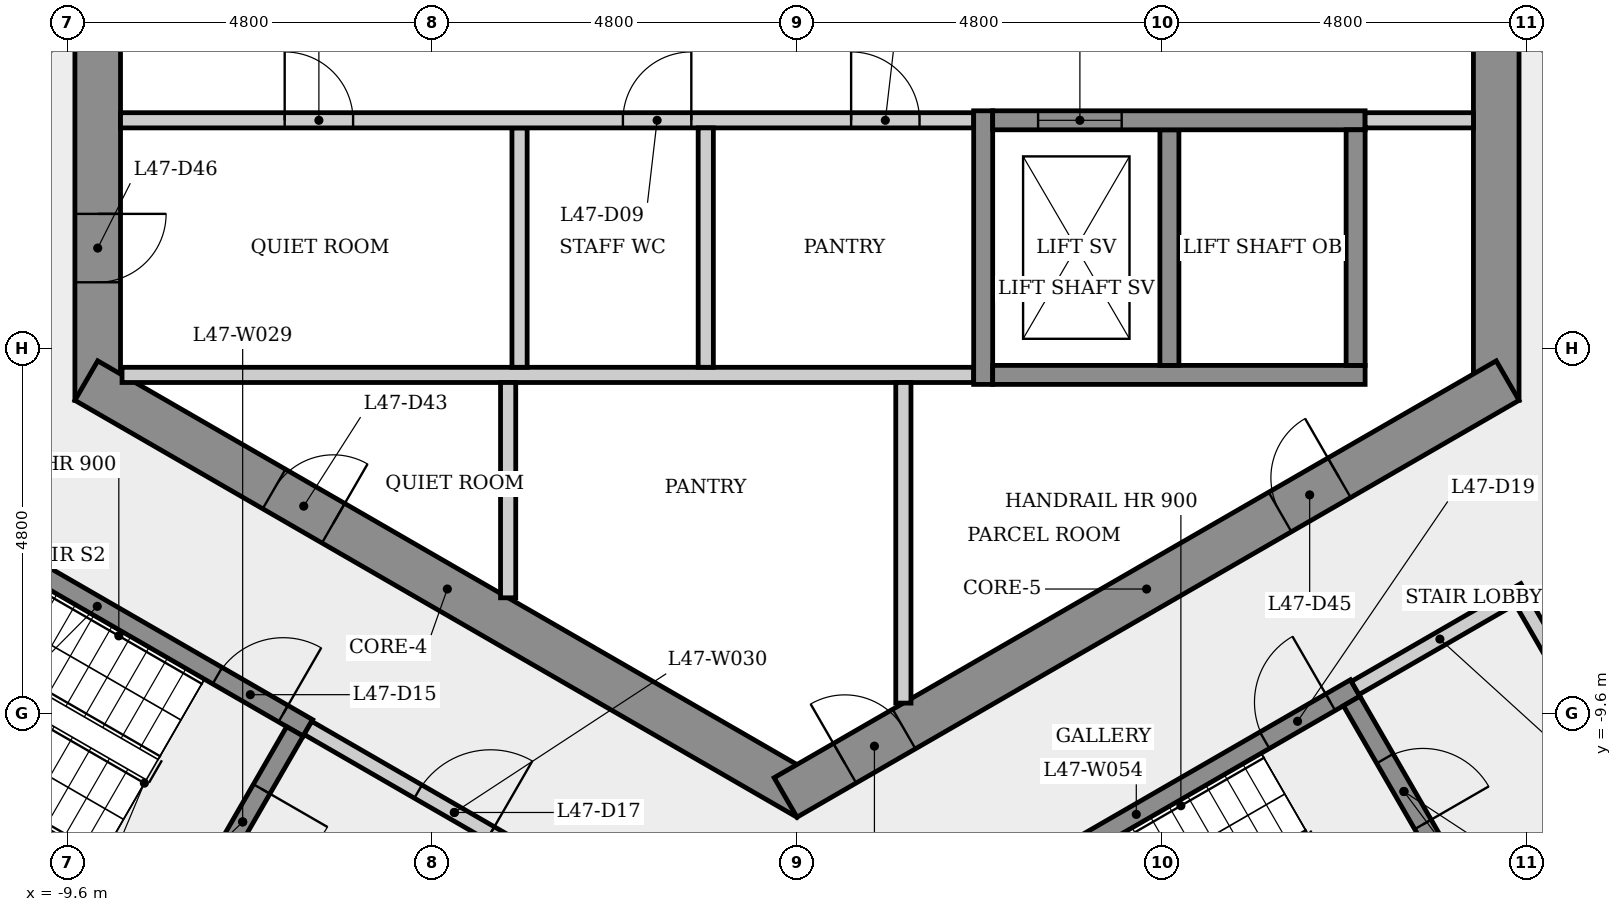
"""IFC4 building model, lengths in metres.
Left out: names, types, materials, properties, quantities, classifications, styles, units other than length and angle.
Written with IfcOpenShell. Run it as: python <this file> out.ifc"""

import sys

from ifc_helpers import new_model, si_unit, direction, frame, frame_2d, origin, place, context, subcontext, project, spatial, rectangle, extrude, element, fill, save


model = new_model("IFC4")
c1 = context("Model", 3, precision=1e-05, world=origin(), true_north=direction((0.0, 1.0)))
c2 = subcontext(c1, "Body", "Model", "MODEL_VIEW")
j1 = project(units=[si_unit("LENGTHUNIT", "METRE"), si_unit("PLANEANGLEUNIT", "RADIAN")], contexts=[c1])
p1 = place(None, origin())
s1 = spatial("IfcSite", under=j1, at=p1, CompositionType="ELEMENT")
p2 = place(p1, origin())
s2 = spatial("IfcBuilding", under=s1, at=p2, CompositionType="ELEMENT")
p3 = place(p2, frame((0.0, 0.0, 176.5)))
s3 = spatial("IfcBuildingStorey", under=s2, at=p3, CompositionType="ELEMENT", Elevation=176.5)
p4 = place(p3, frame((9.2, -5.485, 0.0), z_axis=(0.0, 0.0, 1.0), x_axis=(0.0, 1.0, 0.0)))
e1 = element("IfcWall", 1, at=p4, inside=s3, PredefinedType="SHEAR", context=c2, shape_type="SweptSolid", body=[
    extrude(rectangle(XDim=10.97, YDim=0.6, at=frame_2d((5.485, 0.0))), origin(), (0.0, 0.0, 1.0), 3.4),
])
p5 = place(p4, frame((4.685, 0.0, 0.0)))
e2 = element("IfcOpeningElement", 2, at=p5, cuts=e1, PredefinedType="OPENING", context=c2, shape_type="SweptSolid", body=[
    extrude(rectangle(XDim=1.6, YDim=2.1, at=frame_2d((0.8, 1.05))), frame((0.0, 0.31, 0.0), z_axis=(0.0, -1.0, 0.0), x_axis=(1.0, 0.0, 0.0)), (0.0, 0.0, 1.0), 0.62),
])
p6 = place(p3, frame((-9.2, 5.485, 0.0), z_axis=(0.0, 0.0, 1.0), x_axis=(0.0, -1.0, 0.0)))
e3 = element("IfcWall", 3, at=p6, inside=s3, PredefinedType="SHEAR", context=c2, shape_type="SweptSolid", body=[
    extrude(rectangle(XDim=10.97, YDim=0.6, at=frame_2d((5.485, 0.0))), origin(), (0.0, 0.0, 1.0), 3.4),
])
p7 = place(p6, frame((8.516, 0.0, 0.0)))
e4 = element("IfcOpeningElement", 4, at=p7, cuts=e3, PredefinedType="OPENING", context=c2, shape_type="SweptSolid", body=[
    extrude(rectangle(XDim=0.9, YDim=2.1, at=frame_2d((0.45, 1.05))), frame((0.0, 0.31, 0.0), z_axis=(0.0, -1.0, 0.0), x_axis=(1.0, 0.0, 0.0)), (0.0, 0.0, 1.0), 0.62),
])
p8 = place(p6, frame((4.685, 0.0, 0.0)))
e5 = element("IfcOpeningElement", 5, at=p8, cuts=e3, PredefinedType="OPENING", context=c2, shape_type="SweptSolid", body=[
    extrude(rectangle(XDim=1.6, YDim=2.1, at=frame_2d((0.8, 1.05))), frame((0.0, 0.31, 0.0), z_axis=(0.0, -1.0, 0.0), x_axis=(1.0, 0.0, 0.0)), (0.0, 0.0, 1.0), 0.62),
])
p9 = place(p3, frame((-9.35, -5.225, 0.0), z_axis=(0.0, 0.0, 1.0), x_axis=(0.866023993627, -0.500002442456, 0.0)))
e6 = element("IfcWall", 6, at=p9, inside=s3, PredefinedType="SHEAR", context=c2, shape_type="SweptSolid", body=[
    extrude(rectangle(XDim=10.97, YDim=0.6, at=frame_2d((5.485, 0.0))), origin(), (0.0, 0.0, 1.0), 3.4),
])
p10 = place(p9, frame((2.853, 0.0, 0.0)))
e7 = element("IfcOpeningElement", 7, at=p10, cuts=e6, PredefinedType="OPENING", context=c2, shape_type="SweptSolid", body=[
    extrude(rectangle(XDim=0.9, YDim=2.1, at=frame_2d((0.45, 1.05))), frame((0.0, 0.31, 0.0), z_axis=(0.0, -1.0, 0.0), x_axis=(1.0, 0.0, 0.0)), (0.0, 0.0, 1.0), 0.62),
])
p11 = place(p3, frame((-0.15, -10.71, 0.0), z_axis=(0.0, 0.0, 1.0), x_axis=(0.866023993627, 0.500002442456, 0.0)))
e8 = element("IfcWall", 8, at=p11, inside=s3, PredefinedType="SHEAR", context=c2, shape_type="SweptSolid", body=[
    extrude(rectangle(XDim=10.97, YDim=0.6, at=frame_2d((5.485, 0.0))), origin(), (0.0, 0.0, 1.0), 3.4),
])
p12 = place(p11, frame((0.9, 0.0, 0.0)))
e9 = element("IfcOpeningElement", 9, at=p12, cuts=e8, PredefinedType="OPENING", context=c2, shape_type="SweptSolid", body=[
    extrude(rectangle(XDim=0.9, YDim=2.1, at=frame_2d((0.45, 1.05))), frame((0.0, 0.31, 0.0), z_axis=(0.0, -1.0, 0.0), x_axis=(1.0, 0.0, 0.0)), (0.0, 0.0, 1.0), 0.62),
])
p13 = place(p11, frame((7.512, 0.0, 0.0)))
e10 = element("IfcOpeningElement", 10, at=p13, cuts=e8, PredefinedType="OPENING", context=c2, shape_type="SweptSolid", body=[
    extrude(rectangle(XDim=0.9, YDim=2.1, at=frame_2d((0.45, 1.05))), frame((0.0, 0.31, 0.0), z_axis=(0.0, -1.0, 0.0), x_axis=(1.0, 0.0, 0.0)), (0.0, 0.0, 1.0), 0.62),
])
p14 = place(p3, frame((-11.977, -6.595, 0.0), z_axis=(0.0, 0.0, 1.0), x_axis=(0.866025499775, -0.499999833739, 0.0)))
e11 = element("IfcWall", 11, at=p14, inside=s3, PredefinedType="SHEAR", context=c2, shape_type="SweptSolid", body=[
    extrude(rectangle(XDim=6.4, YDim=0.25, at=frame_2d((3.2, 0.0))), origin(), (0.0, 0.0, 1.0), 3.05),
])
p15 = place(p14, frame((5.025, 0.0, 0.0)))
e12 = element("IfcOpeningElement", 12, at=p15, cuts=e11, PredefinedType="OPENING", context=c2, shape_type="SweptSolid", body=[
    extrude(rectangle(XDim=1.0, YDim=2.1, at=frame_2d((0.5, 1.05))), frame((0.0, 0.135, 0.0), z_axis=(0.0, -1.0, 0.0), x_axis=(1.0, 0.0, 0.0)), (0.0, 0.0, 1.0), 0.27),
])
p16 = place(p3, frame((-8.88, -5.15, 0.0), z_axis=(0.0, 0.0, 1.0), x_axis=(1.0, 0.0, 0.0)))
e13 = element("IfcWall", 13, at=p16, inside=s3, PredefinedType="PARTITIONING", context=c2, shape_type="SweptSolid", body=[
    extrude(rectangle(XDim=11.205, YDim=0.2, at=frame_2d((5.603, 0.0))), origin(), (0.0, 0.0, 1.0), 3.05),
])
p17 = place(p3, frame((-7.935, -12.393, 0.0), z_axis=(0.0, 0.0, 1.0), x_axis=(-0.866025499775, 0.499999833739, 0.0)))
e14 = element("IfcWall", 14, at=p17, inside=s3, PredefinedType="SHEAR", context=c2, shape_type="SweptSolid", body=[
    extrude(rectangle(XDim=6.4, YDim=0.25, at=frame_2d((3.2, 0.0))), origin(), (0.0, 0.0, 1.0), 3.05),
])
p18 = place(p3, frame((-6.605, -9.841, 0.0), z_axis=(0.0, 0.0, 1.0), x_axis=(-0.499996545922, -0.866027397988, 0.0)))
e15 = element("IfcWall", 15, at=p18, inside=s3, PredefinedType="SHEAR", context=c2, shape_type="SweptSolid", body=[
    extrude(rectangle(XDim=2.75, YDim=0.25, at=frame_2d((1.375, 0.0))), origin(), (0.0, 0.0, 1.0), 3.05),
])
p19 = place(p18, frame((0.875, 0.0, 0.0)))
e16 = element("IfcOpeningElement", 16, at=p19, cuts=e15, PredefinedType="OPENING", context=c2, shape_type="SweptSolid", body=[
    extrude(rectangle(XDim=1.0, YDim=2.1, at=frame_2d((0.5, 1.05))), frame((0.0, 0.135, 0.0), z_axis=(0.0, -1.0, 0.0), x_axis=(1.0, 0.0, 0.0)), (0.0, 0.0, 1.0), 0.27),
])
p20 = place(p3, frame((-6.435, -9.795, 0.0), z_axis=(0.0, 0.0, 1.0), x_axis=(0.866012907634, -0.500021643343, 0.0)))
e17 = element("IfcWall", 17, at=p20, inside=s3, PredefinedType="PARTITIONING", context=c2, shape_type="SweptSolid", body=[
    extrude(rectangle(XDim=4.45, YDim=0.2, at=frame_2d((2.225, 0.0))), origin(), (0.0, 0.0, 1.0), 3.05),
])
p21 = place(p20, frame((1.675, 0.0, 0.0)))
e18 = element("IfcOpeningElement", 18, at=p21, cuts=e17, PredefinedType="OPENING", context=c2, shape_type="SweptSolid", body=[
    extrude(rectangle(XDim=1.1, YDim=2.1, at=frame_2d((0.55, 1.05))), frame((0.0, 0.11, 0.0), z_axis=(0.0, -1.0, 0.0), x_axis=(1.0, 0.0, 0.0)), (0.0, 0.0, 1.0), 0.22),
])
p22 = place(p3, frame((-3.8, -5.25, 0.0), z_axis=(0.0, 0.0, 1.0), x_axis=(0.0, -1.0, 0.0)))
e19 = element("IfcWall", 19, at=p22, inside=s3, PredefinedType="PARTITIONING", context=c2, shape_type="SweptSolid", body=[
    extrude(rectangle(XDim=2.833, YDim=0.2, at=frame_2d((1.417, 0.0))), origin(), (0.0, 0.0, 1.0), 3.05),
])
p23 = place(p3, frame((-3.65, -1.9, 0.0), z_axis=(0.0, 0.0, 1.0), x_axis=(0.0, -1.0, 0.0)))
e20 = element("IfcWall", 20, at=p23, inside=s3, PredefinedType="PARTITIONING", context=c2, shape_type="SweptSolid", body=[
    extrude(rectangle(XDim=3.15, YDim=0.2, at=frame_2d((1.575, 0.0))), origin(), (0.0, 0.0, 1.0), 3.05),
])
p24 = place(p3, frame((-8.9, -1.8, 0.0), z_axis=(0.0, 0.0, 1.0), x_axis=(1.0, 0.0, 0.0)))
e21 = element("IfcWall", 21, at=p24, inside=s3, PredefinedType="PARTITIONING", context=c2, shape_type="SweptSolid", body=[
    extrude(rectangle(XDim=11.225, YDim=0.2, at=frame_2d((5.613, 0.0))), origin(), (0.0, 0.0, 1.0), 3.05),
])
p25 = place(p24, frame((2.16, 0.0, 0.0)))
e22 = element("IfcOpeningElement", 22, at=p25, cuts=e21, PredefinedType="OPENING", context=c2, shape_type="SweptSolid", body=[
    extrude(rectangle(XDim=0.9, YDim=2.1, at=frame_2d((0.45, 1.05))), frame((0.0, 0.11, 0.0), z_axis=(0.0, -1.0, 0.0), x_axis=(1.0, 0.0, 0.0)), (0.0, 0.0, 1.0), 0.22),
])
p26 = place(p24, frame((6.61, 0.0, 0.0)))
e23 = element("IfcOpeningElement", 23, at=p26, cuts=e21, PredefinedType="OPENING", context=c2, shape_type="SweptSolid", body=[
    extrude(rectangle(XDim=0.9, YDim=2.1, at=frame_2d((0.45, 1.05))), frame((0.0, 0.11, 0.0), z_axis=(0.0, -1.0, 0.0), x_axis=(1.0, 0.0, 0.0)), (0.0, 0.0, 1.0), 0.22),
])
p27 = place(p24, frame((9.613, 0.0, 0.0)))
e24 = element("IfcOpeningElement", 24, at=p27, cuts=e21, PredefinedType="OPENING", context=c2, shape_type="SweptSolid", body=[
    extrude(rectangle(XDim=0.9, YDim=2.1, at=frame_2d((0.45, 1.05))), frame((0.0, 0.11, 0.0), z_axis=(0.0, -1.0, 0.0), x_axis=(1.0, 0.0, 0.0)), (0.0, 0.0, 1.0), 0.22),
])
p28 = place(p3, frame((-1.2, -1.9, 0.0), z_axis=(0.0, 0.0, 1.0), x_axis=(0.0, -1.0, 0.0)))
e25 = element("IfcWall", 25, at=p28, inside=s3, PredefinedType="PARTITIONING", context=c2, shape_type="SweptSolid", body=[
    extrude(rectangle(XDim=3.15, YDim=0.2, at=frame_2d((1.575, 0.0))), origin(), (0.0, 0.0, 1.0), 3.05),
])
p29 = place(p3, frame((1.4, -5.25, 0.0), z_axis=(0.0, 0.0, 1.0), x_axis=(0.0, -1.0, 0.0)))
e26 = element("IfcWall", 26, at=p29, inside=s3, PredefinedType="PARTITIONING", context=c2, shape_type="SweptSolid", body=[
    extrude(rectangle(XDim=4.219, YDim=0.2, at=frame_2d((2.109, 0.0))), origin(), (0.0, 0.0, 1.0), 3.05),
])
p30 = place(p3, frame((1.585, -12.595, 0.0), z_axis=(0.0, 0.0, 1.0), x_axis=(0.866036417653, 0.499980922934, 0.0)))
e27 = element("IfcWall", 27, at=p30, inside=s3, PredefinedType="SHEAR", context=c2, shape_type="SweptSolid", body=[
    extrude(rectangle(XDim=6.65, YDim=0.25, at=frame_2d((3.325, 0.0))), origin(), (0.0, 0.0, 1.0), 3.05),
])
p31 = place(p30, frame((5.275, 0.0, 0.0)))
e28 = element("IfcOpeningElement", 28, at=p31, cuts=e27, PredefinedType="OPENING", context=c2, shape_type="SweptSolid", body=[
    extrude(rectangle(XDim=1.0, YDim=2.1, at=frame_2d((0.5, 1.05))), frame((0.0, 0.135, 0.0), z_axis=(0.0, -1.0, 0.0), x_axis=(1.0, 0.0, 0.0)), (0.0, 0.0, 1.0), 0.27),
])
p32 = place(p3, frame((2.45, -5.275, 0.0), z_axis=(0.0, 0.0, 1.0), x_axis=(0.0, 1.0, 0.0)))
e29 = element("IfcWall", 29, at=p32, inside=s3, PredefinedType="SHEAR", context=c2, shape_type="SweptSolid", body=[
    extrude(rectangle(XDim=3.6, YDim=0.25, at=frame_2d((1.8, 0.0))), origin(), (0.0, 0.0, 1.0), 3.05),
])
p33 = place(p3, frame((2.575, -5.15, 0.0), z_axis=(0.0, 0.0, 1.0), x_axis=(1.0, 0.0, 0.0)))
e30 = element("IfcWall", 30, at=p33, inside=s3, PredefinedType="SHEAR", context=c2, shape_type="SweptSolid", body=[
    extrude(rectangle(XDim=4.9, YDim=0.25, at=frame_2d((2.45, 0.0))), origin(), (0.0, 0.0, 1.0), 3.05),
])
p34 = place(p3, frame((4.9, -1.925, 0.0), z_axis=(0.0, 0.0, 1.0), x_axis=(0.0, -1.0, 0.0)))
e31 = element("IfcWall", 31, at=p34, inside=s3, PredefinedType="SHEAR", context=c2, shape_type="SweptSolid", body=[
    extrude(rectangle(XDim=3.1, YDim=0.25, at=frame_2d((1.55, 0.0))), origin(), (0.0, 0.0, 1.0), 3.4),
])
p35 = place(p3, frame((2.575, -1.8, 0.0), z_axis=(0.0, 0.0, 1.0), x_axis=(1.0, 0.0, 0.0)))
e32 = element("IfcWall", 32, at=p35, inside=s3, PredefinedType="SHEAR", context=c2, shape_type="SweptSolid", body=[
    extrude(rectangle(XDim=4.9, YDim=0.25, at=frame_2d((2.45, 0.0))), origin(), (0.0, 0.0, 1.0), 3.05),
])
p36 = place(p35, frame((0.597, 0.0, 0.0)))
e33 = element("IfcOpeningElement", 33, at=p36, cuts=e32, PredefinedType="OPENING", context=c2, shape_type="SweptSolid", body=[
    extrude(rectangle(XDim=1.1, YDim=2.1, at=frame_2d((0.55, 1.05))), frame((0.0, 0.135, 0.0), z_axis=(0.0, -1.0, 0.0), x_axis=(1.0, 0.0, 0.0)), (0.0, 0.0, 1.0), 0.27),
])
p37 = place(p3, frame((7.298, -9.441, 0.0), z_axis=(0.0, 0.0, 1.0), x_axis=(0.500034990121, -0.866005201286, 0.0)))
e34 = element("IfcWall", 34, at=p37, inside=s3, PredefinedType="SHEAR", context=c2, shape_type="SweptSolid", body=[
    extrude(rectangle(XDim=2.75, YDim=0.25, at=frame_2d((1.375, 0.0))), origin(), (0.0, 0.0, 1.0), 3.05),
])
p38 = place(p37, frame((0.875, 0.0, 0.0)))
e35 = element("IfcOpeningElement", 35, at=p38, cuts=e34, PredefinedType="OPENING", context=c2, shape_type="SweptSolid", body=[
    extrude(rectangle(XDim=1.0, YDim=2.1, at=frame_2d((0.5, 1.05))), frame((0.0, 0.135, 0.0), z_axis=(0.0, -1.0, 0.0), x_axis=(1.0, 0.0, 0.0)), (0.0, 0.0, 1.0), 0.27),
])
p39 = place(p3, frame((7.344, -9.27, 0.0), z_axis=(0.0, 0.0, 1.0), x_axis=(0.866005588531, 0.500034319456, 0.0)))
e36 = element("IfcWall", 36, at=p39, inside=s3, PredefinedType="PARTITIONING", context=c2, shape_type="SweptSolid", body=[
    extrude(rectangle(XDim=2.575, YDim=0.2, at=frame_2d((1.288, 0.0))), origin(), (0.0, 0.0, 1.0), 3.05),
])
p40 = place(p3, frame((7.35, -1.925, 0.0), z_axis=(0.0, 0.0, 1.0), x_axis=(0.0, -1.0, 0.0)))
e37 = element("IfcWall", 37, at=p40, inside=s3, PredefinedType="SHEAR", context=c2, shape_type="SweptSolid", body=[
    extrude(rectangle(XDim=3.1, YDim=0.25, at=frame_2d((1.55, 0.0))), origin(), (0.0, 0.0, 1.0), 3.4),
])
p41 = place(p3, frame((8.9, -1.8, 0.0), z_axis=(0.0, 0.0, 1.0), x_axis=(-1.0, 0.0, 0.0)))
e38 = element("IfcWall", 38, at=p41, inside=s3, PredefinedType="PARTITIONING", context=c2, shape_type="SweptSolid", body=[
    extrude(rectangle(XDim=1.425, YDim=0.2, at=frame_2d((0.712, 0.0))), origin(), (0.0, 0.0, 1.0), 3.05),
])
p42 = place(p3, frame((9.537, -8.119, 0.0), z_axis=(0.0, 0.0, 1.0), x_axis=(0.499990139034, -0.866031096941, 0.0)))
e39 = element("IfcWall", 39, at=p42, inside=s3, PredefinedType="PARTITIONING", context=c2, shape_type="SweptSolid", body=[
    extrude(rectangle(XDim=3.0, YDim=0.2, at=frame_2d((1.5, 0.0))), origin(), (0.0, 0.0, 1.0), 3.05),
])
p43 = place(p42, frame((0.935, 0.0, 0.0)))
e40 = element("IfcOpeningElement", 40, at=p43, cuts=e39, PredefinedType="OPENING", context=c2, shape_type="SweptSolid", body=[
    extrude(rectangle(XDim=1.0, YDim=2.1, at=frame_2d((0.5, 1.05))), frame((0.0, 0.11, 0.0), z_axis=(0.0, -1.0, 0.0), x_axis=(1.0, 0.0, 0.0)), (0.0, 0.0, 1.0), 0.22),
])
p44 = place(p3, frame((10.901, -10.681, 0.0), z_axis=(0.0, 0.0, 1.0), x_axis=(-0.866007538022, -0.500030943131, 0.0)))
e41 = element("IfcWall", 41, at=p44, inside=s3, PredefinedType="PARTITIONING", context=c2, shape_type="SweptSolid", body=[
    extrude(rectangle(XDim=2.375, YDim=0.2, at=frame_2d((1.188, 0.0))), origin(), (0.0, 0.0, 1.0), 3.05),
])
p45 = place(p36, origin())
e42 = element("IfcDoor", 42, at=p45, inside=s3, OperationType="SLIDING_TO_LEFT", PredefinedType="DOOR", context=c2, shape_type="SweptSolid", body=[
    extrude(rectangle(XDim=1.1, YDim=2.1, at=frame_2d((0.55, 1.05))), frame((0.0, 0.025, 0.0), z_axis=(0.0, -1.0, 0.0), x_axis=(1.0, 0.0, 0.0)), (0.0, 0.0, 1.0), 0.05),
])
fill(e33, e42)
p46 = place(p25, origin())
e43 = element("IfcDoor", 43, at=p46, inside=s3, OperationType="SINGLE_SWING_LEFT", PredefinedType="DOOR", context=c2, shape_type="SweptSolid", body=[
    extrude(rectangle(XDim=0.9, YDim=2.1, at=frame_2d((0.45, 1.05))), frame((0.0, 0.025, 0.0), z_axis=(0.0, -1.0, 0.0), x_axis=(1.0, 0.0, 0.0)), (0.0, 0.0, 1.0), 0.05),
])
fill(e22, e43)
p47 = place(p26, origin())
e44 = element("IfcDoor", 44, at=p47, inside=s3, OperationType="SINGLE_SWING_RIGHT", PredefinedType="DOOR", context=c2, shape_type="SweptSolid", body=[
    extrude(rectangle(XDim=0.9, YDim=2.1, at=frame_2d((0.45, 1.05))), frame((0.0, 0.025, 0.0), z_axis=(0.0, -1.0, 0.0), x_axis=(1.0, 0.0, 0.0)), (0.0, 0.0, 1.0), 0.05),
])
fill(e23, e44)
p48 = place(p27, origin())
e45 = element("IfcDoor", 45, at=p48, inside=s3, OperationType="SINGLE_SWING_LEFT", PredefinedType="DOOR", context=c2, shape_type="SweptSolid", body=[
    extrude(rectangle(XDim=0.9, YDim=2.1, at=frame_2d((0.45, 1.05))), frame((0.0, 0.025, 0.0), z_axis=(0.0, -1.0, 0.0), x_axis=(1.0, 0.0, 0.0)), (0.0, 0.0, 1.0), 0.05),
])
fill(e24, e45)
p49 = place(p15, origin())
e46 = element("IfcDoor", 46, at=p49, inside=s3, OperationType="SINGLE_SWING_RIGHT", PredefinedType="DOOR", context=c2, shape_type="SweptSolid", body=[
    extrude(rectangle(XDim=1.0, YDim=2.1, at=frame_2d((0.5, 1.05))), frame((0.0, 0.025, 0.0), z_axis=(0.0, -1.0, 0.0), x_axis=(1.0, 0.0, 0.0)), (0.0, 0.0, 1.0), 0.05),
])
fill(e12, e46)
p50 = place(p19, origin())
e47 = element("IfcDoor", 47, at=p50, inside=s3, OperationType="SINGLE_SWING_LEFT", PredefinedType="DOOR", context=c2, shape_type="SweptSolid", body=[
    extrude(rectangle(XDim=1.0, YDim=2.1, at=frame_2d((0.5, 1.05))), frame((0.0, 0.025, 0.0), z_axis=(0.0, -1.0, 0.0), x_axis=(1.0, 0.0, 0.0)), (0.0, 0.0, 1.0), 0.05),
])
fill(e16, e47)
p51 = place(p21, origin())
e48 = element("IfcDoor", 48, at=p51, inside=s3, OperationType="SINGLE_SWING_RIGHT", PredefinedType="DOOR", context=c2, shape_type="SweptSolid", body=[
    extrude(rectangle(XDim=1.1, YDim=2.1, at=frame_2d((0.55, 1.05))), frame((0.0, 0.025, 0.0), z_axis=(0.0, -1.0, 0.0), x_axis=(1.0, 0.0, 0.0)), (0.0, 0.0, 1.0), 0.05),
])
fill(e18, e48)
p52 = place(p31, origin())
e49 = element("IfcDoor", 49, at=p52, inside=s3, OperationType="SINGLE_SWING_RIGHT", PredefinedType="DOOR", context=c2, shape_type="SweptSolid", body=[
    extrude(rectangle(XDim=1.0, YDim=2.1, at=frame_2d((0.5, 1.05))), frame((0.0, 0.025, 0.0), z_axis=(0.0, -1.0, 0.0), x_axis=(1.0, 0.0, 0.0)), (0.0, 0.0, 1.0), 0.05),
])
fill(e28, e49)
p53 = place(p38, origin())
e50 = element("IfcDoor", 50, at=p53, inside=s3, OperationType="SINGLE_SWING_RIGHT", PredefinedType="DOOR", context=c2, shape_type="SweptSolid", body=[
    extrude(rectangle(XDim=1.0, YDim=2.1, at=frame_2d((0.5, 1.05))), frame((0.0, 0.025, 0.0), z_axis=(0.0, -1.0, 0.0), x_axis=(1.0, 0.0, 0.0)), (0.0, 0.0, 1.0), 0.05),
])
fill(e35, e50)
p54 = place(p10, origin())
e51 = element("IfcDoor", 51, at=p54, inside=s3, OperationType="SINGLE_SWING_RIGHT", PredefinedType="DOOR", context=c2, shape_type="SweptSolid", body=[
    extrude(rectangle(XDim=0.9, YDim=2.1, at=frame_2d((0.45, 1.05))), frame((0.0, 0.025, 0.0), z_axis=(0.0, -1.0, 0.0), x_axis=(1.0, 0.0, 0.0)), (0.0, 0.0, 1.0), 0.05),
])
fill(e7, e51)
p55 = place(p12, origin())
e52 = element("IfcDoor", 52, at=p55, inside=s3, OperationType="SINGLE_SWING_LEFT", PredefinedType="DOOR", context=c2, shape_type="SweptSolid", body=[
    extrude(rectangle(XDim=0.9, YDim=2.1, at=frame_2d((0.45, 1.05))), frame((0.0, 0.025, 0.0), z_axis=(0.0, -1.0, 0.0), x_axis=(1.0, 0.0, 0.0)), (0.0, 0.0, 1.0), 0.05),
])
fill(e9, e52)
p56 = place(p13, origin())
e53 = element("IfcDoor", 53, at=p56, inside=s3, OperationType="SINGLE_SWING_RIGHT", PredefinedType="DOOR", context=c2, shape_type="SweptSolid", body=[
    extrude(rectangle(XDim=0.9, YDim=2.1, at=frame_2d((0.45, 1.05))), frame((0.0, 0.025, 0.0), z_axis=(0.0, -1.0, 0.0), x_axis=(1.0, 0.0, 0.0)), (0.0, 0.0, 1.0), 0.05),
])
fill(e10, e53)
p57 = place(p7, origin())
e54 = element("IfcDoor", 54, at=p57, inside=s3, OperationType="SINGLE_SWING_LEFT", PredefinedType="DOOR", context=c2, shape_type="SweptSolid", body=[
    extrude(rectangle(XDim=0.9, YDim=2.1, at=frame_2d((0.45, 1.05))), frame((0.0, 0.025, 0.0), z_axis=(0.0, -1.0, 0.0), x_axis=(1.0, 0.0, 0.0)), (0.0, 0.0, 1.0), 0.05),
])
fill(e4, e54)
save(model, sys.argv[1])
